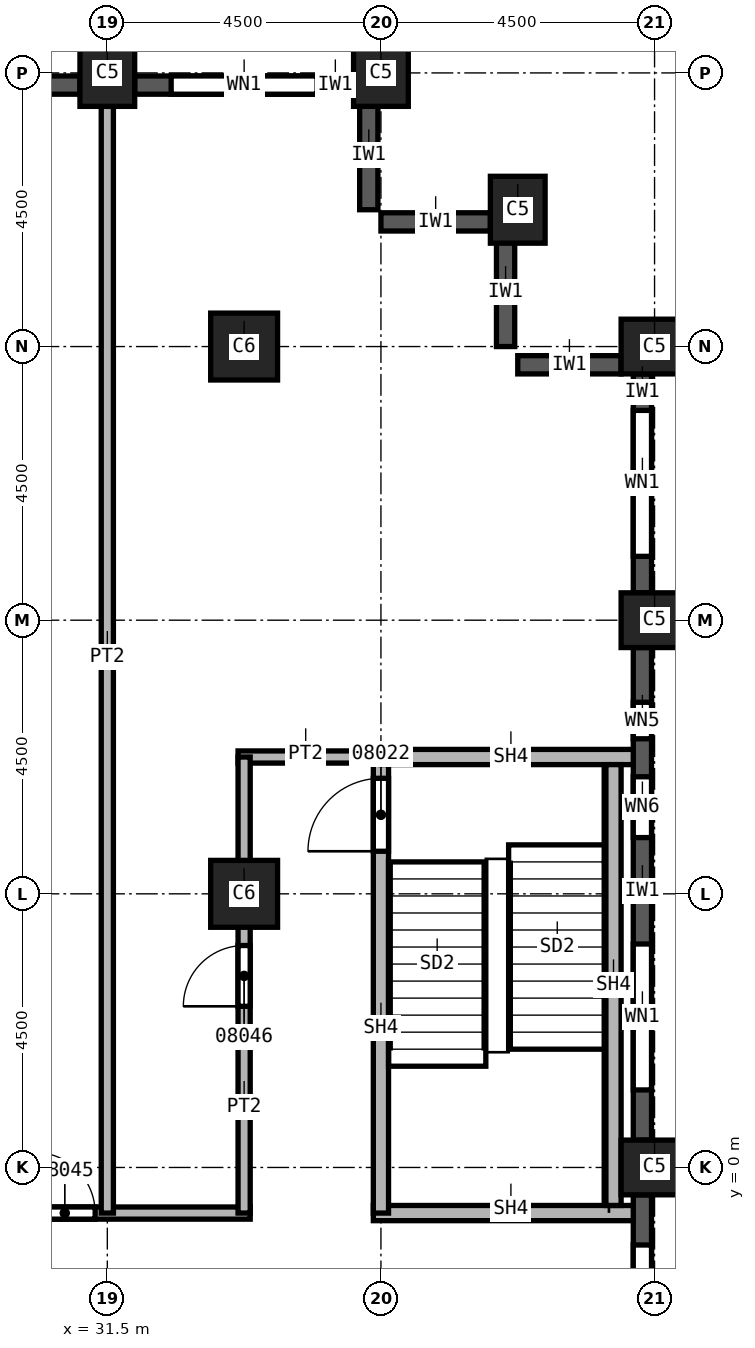
"""IFC4 building model, lengths in metres.
Left out: names, types, materials, properties, quantities, classifications, styles, units other than length and angle.
Written with IfcOpenShell. Run it as: python <this file> out.ifc"""

import sys

from ifc_helpers import new_model, si_unit, direction, frame, frame_2d, origin, origin_2d, place, context, subcontext, project, spatial, rectangle, extrude, element, fill, save


model = new_model("IFC4")
c1 = context("Model", 3, precision=1e-05, world=origin(), true_north=direction((0.0, 1.0)))
c2 = subcontext(c1, "Body", "Model", "MODEL_VIEW")
j1 = project(units=[si_unit("LENGTHUNIT", "METRE"), si_unit("PLANEANGLEUNIT", "RADIAN")], contexts=[c1])
p1 = place(None, origin())
s1 = spatial("IfcSite", under=j1, at=p1, CompositionType="ELEMENT")
p2 = place(p1, origin())
s2 = spatial("IfcBuilding", under=s1, at=p2, CompositionType="ELEMENT")
p3 = place(p2, frame((0.0, 0.0, 150.0)))
s3 = spatial("IfcBuildingStorey", under=s2, at=p3, CompositionType="ELEMENT", Elevation=150.0)
for number, where, z_axis, x_axis in (
    (1, (40.5, 0.0, 0.0), (0.0, 0.0, 1.0), (0.0, 1.0, 0.0)),
    (2, (40.5, 9.0, 0.0), (0.0, 0.0, 1.0), (0.0, 1.0, 0.0)),
    (3, (40.5, 13.5, 0.0), (0.0, 0.0, 1.0), (0.0, 1.0, 0.0)),
    (4, (38.25, 15.75, 0.0), (0.0, 0.0, 1.0), (1.0, 0.0, 0.0)),
    (5, (31.5, 18.0, 0.0), (0.0, 0.0, 1.0), (1.0, 0.0, 0.0)),
    (6, (36.0, 18.0, 0.0), (0.0, 0.0, 1.0), (1.0, 0.0, 0.0)),
):
    element("IfcColumn", number, at=place(p3, frame(where, z_axis=z_axis, x_axis=x_axis)), inside=s3, PredefinedType="COLUMN", context=c2, shape_type="SweptSolid", body=[
        extrude(rectangle(XDim=0.9, YDim=1.1, at=origin_2d()), origin(), (0.0, 0.0, 1.0), 3.7),
    ])
for number, where, z_axis, x_axis in (
    (7, (33.75, 4.5, 0.0), (0.0, 0.0, 1.0), (1.0, 0.0, 0.0)),
    (8, (33.75, 13.5, 0.0), (0.0, 0.0, 1.0), (1.0, 0.0, 0.0)),
):
    element("IfcColumn", number, at=place(p3, frame(where, z_axis=z_axis, x_axis=x_axis)), inside=s3, PredefinedType="COLUMN", context=c2, shape_type="SweptSolid", body=[
        extrude(rectangle(XDim=1.1, YDim=1.1, at=origin_2d()), origin(), (0.0, 0.0, 1.0), 3.7),
    ])
p4 = place(p3, frame((39.95, 13.2, 0.0), z_axis=(0.0, 0.0, 1.0), x_axis=(-1.0, 0.0, 0.0)))
e9 = element("IfcWall", 9, at=p4, inside=s3, PredefinedType="SOLIDWALL", context=c2, shape_type="SweptSolid", body=[
    extrude(rectangle(XDim=1.7, YDim=0.3, at=frame_2d((0.85, 0.0))), origin(), (0.0, 0.0, 1.0), 3.1),
])
for number, where, z_axis, x_axis in (
    (10, (38.05, 15.3, 0.0), (0.0, 0.0, 1.0), (0.0, -1.0, 0.0)),
    (11, (37.8, 15.55, 0.0), (0.0, 0.0, 1.0), (-1.0, 0.0, 0.0)),
    (12, (35.8, 17.55, 0.0), (0.0, 0.0, 1.0), (0.0, -1.0, 0.0)),
):
    element("IfcWall", number, at=place(p3, frame(where, z_axis=z_axis, x_axis=x_axis)), inside=s3, PredefinedType="SOLIDWALL", context=c2, shape_type="SweptSolid", body=[
        extrude(rectangle(XDim=1.8, YDim=0.3, at=frame_2d((0.9, 0.0))), origin(), (0.0, 0.0, 1.0), 3.1),
    ])
p5 = place(p3, frame((40.3, -8.55, 0.0), z_axis=(0.0, 0.0, 1.0), x_axis=(0.0, 1.0, 0.0)))
e13 = element("IfcWall", 13, at=p5, inside=s3, PredefinedType="SOLIDWALL", context=c2, shape_type="SweptSolid", body=[
    extrude(rectangle(XDim=8.1, YDim=0.3, at=frame_2d((4.05, 0.0))), origin(), (0.0, 0.0, 1.0), 3.1),
])
p6 = place(p5, frame((0.825, 0.0, 0.8)))
e14 = element("IfcOpeningElement", 14, at=p6, cuts=e13, PredefinedType="OPENING", context=c2, shape_type="SweptSolid", body=[
    extrude(rectangle(XDim=2.4, YDim=1.95, at=frame_2d((1.2, 0.975))), frame((0.0, 0.15, 0.0), z_axis=(0.0, -1.0, 0.0), x_axis=(1.0, 0.0, 0.0)), (0.0, 0.0, 1.0), 0.3),
])
p7 = place(p5, frame((4.875, 0.0, 0.8)))
e15 = element("IfcOpeningElement", 15, at=p7, cuts=e13, PredefinedType="OPENING", context=c2, shape_type="SweptSolid", body=[
    extrude(rectangle(XDim=2.4, YDim=1.95, at=frame_2d((1.2, 0.975))), frame((0.0, 0.15, 0.0), z_axis=(0.0, -1.0, 0.0), x_axis=(1.0, 0.0, 0.0)), (0.0, 0.0, 1.0), 0.3),
])
p8 = place(p3, frame((40.3, 0.45, 0.0), z_axis=(0.0, 0.0, 1.0), x_axis=(0.0, 1.0, 0.0)))
e16 = element("IfcWall", 16, at=p8, inside=s3, PredefinedType="SOLIDWALL", context=c2, shape_type="SweptSolid", body=[
    extrude(rectangle(XDim=8.1, YDim=0.3, at=frame_2d((4.05, 0.0))), origin(), (0.0, 0.0, 1.0), 3.1),
])
p9 = place(p8, frame((0.825, 0.0, 0.8)))
e17 = element("IfcOpeningElement", 17, at=p9, cuts=e16, PredefinedType="OPENING", context=c2, shape_type="SweptSolid", body=[
    extrude(rectangle(XDim=2.4, YDim=1.95, at=frame_2d((1.2, 0.975))), frame((0.0, 0.15, 0.0), z_axis=(0.0, -1.0, 0.0), x_axis=(1.0, 0.0, 0.0)), (0.0, 0.0, 1.0), 0.3),
])
p10 = place(p8, frame((4.975, 0.0, 0.8)))
e18 = element("IfcOpeningElement", 18, at=p10, cuts=e16, PredefinedType="OPENING", context=c2, shape_type="SweptSolid", body=[
    extrude(rectangle(XDim=1.0, YDim=1.95, at=frame_2d((0.5, 0.975))), frame((0.0, 0.15, 0.0), z_axis=(0.0, -1.0, 0.0), x_axis=(1.0, 0.0, 0.0)), (0.0, 0.0, 1.0), 0.3),
])
p11 = place(p8, frame((6.6, 0.0, 0.8)))
e19 = element("IfcOpeningElement", 19, at=p11, cuts=e16, PredefinedType="OPENING", context=c2, shape_type="SweptSolid", body=[
    extrude(rectangle(XDim=0.6, YDim=1.95, at=frame_2d((0.3, 0.975))), frame((0.0, 0.15, 0.0), z_axis=(0.0, -1.0, 0.0), x_axis=(1.0, 0.0, 0.0)), (0.0, 0.0, 1.0), 0.3),
])
p12 = place(p3, frame((40.3, 9.45, 0.0), z_axis=(0.0, 0.0, 1.0), x_axis=(0.0, 1.0, 0.0)))
e20 = element("IfcWall", 20, at=p12, inside=s3, PredefinedType="SOLIDWALL", context=c2, shape_type="SweptSolid", body=[
    extrude(rectangle(XDim=3.6, YDim=0.3, at=frame_2d((1.8, 0.0))), origin(), (0.0, 0.0, 1.0), 3.1),
])
p13 = place(p12, frame((0.6, 0.0, 0.8)))
e21 = element("IfcOpeningElement", 21, at=p13, cuts=e20, PredefinedType="OPENING", context=c2, shape_type="SweptSolid", body=[
    extrude(rectangle(XDim=2.4, YDim=1.95, at=frame_2d((1.2, 0.975))), frame((0.0, 0.15, 0.0), z_axis=(0.0, -1.0, 0.0), x_axis=(1.0, 0.0, 0.0)), (0.0, 0.0, 1.0), 0.3),
])
p14 = place(p3, frame((35.55, 17.8, 0.0), z_axis=(0.0, 0.0, 1.0), x_axis=(-1.0, 0.0, 0.0)))
e22 = element("IfcWall", 22, at=p14, inside=s3, PredefinedType="SOLIDWALL", context=c2, shape_type="SweptSolid", body=[
    extrude(rectangle(XDim=3.6, YDim=0.3, at=frame_2d((1.8, 0.0))), origin(), (0.0, 0.0, 1.0), 3.1),
])
p15 = place(p14, frame((0.6, 0.0, 0.8)))
e23 = element("IfcOpeningElement", 23, at=p15, cuts=e22, PredefinedType="OPENING", context=c2, shape_type="SweptSolid", body=[
    extrude(rectangle(XDim=2.4, YDim=1.95, at=frame_2d((1.2, 0.975))), frame((0.0, 0.15, 0.0), z_axis=(0.0, -1.0, 0.0), x_axis=(1.0, 0.0, 0.0)), (0.0, 0.0, 1.0), 0.3),
])
p16 = place(p3, frame((31.05, 17.8, 0.0), z_axis=(0.0, 0.0, 1.0), x_axis=(-1.0, 0.0, 0.0)))
e24 = element("IfcWall", 24, at=p16, inside=s3, PredefinedType="SOLIDWALL", context=c2, shape_type="SweptSolid", body=[
    extrude(rectangle(XDim=3.6, YDim=0.3, at=frame_2d((1.8, 0.0))), origin(), (0.0, 0.0, 1.0), 3.1),
])
p17 = place(p16, frame((0.6, 0.0, 0.8)))
e25 = element("IfcOpeningElement", 25, at=p17, cuts=e24, PredefinedType="OPENING", context=c2, shape_type="SweptSolid", body=[
    extrude(rectangle(XDim=2.4, YDim=1.95, at=frame_2d((1.2, 0.975))), frame((0.0, 0.15, 0.0), z_axis=(0.0, -1.0, 0.0), x_axis=(1.0, 0.0, 0.0)), (0.0, 0.0, 1.0), 0.3),
])
p18 = place(p3, frame((19.9, -0.75, 0.0), z_axis=(0.0, 0.0, 1.0), x_axis=(1.0, 0.0, 0.0)))
e26 = element("IfcWall", 26, at=p18, inside=s3, PredefinedType="PARTITIONING", context=c2, shape_type="SweptSolid", body=[
    extrude(rectangle(XDim=13.95, YDim=0.2, at=frame_2d((6.975, 0.0))), origin(), (0.0, 0.0, 1.0), 3.7),
])
p19 = place(p18, frame((10.4, 0.0, 0.0)))
e27 = element("IfcOpeningElement", 27, at=p19, cuts=e26, PredefinedType="OPENING", context=c2, shape_type="SweptSolid", body=[
    extrude(rectangle(XDim=1.0, YDim=2.1, at=frame_2d((0.5, 1.05))), frame((0.0, 0.1, 0.0), z_axis=(0.0, -1.0, 0.0), x_axis=(1.0, 0.0, 0.0)), (0.0, 0.0, 1.0), 0.2),
])
p20 = place(p3, frame((31.5, 17.45, 0.0), z_axis=(0.0, 0.0, 1.0), x_axis=(0.0, -1.0, 0.0)))
e28 = element("IfcWall", 28, at=p20, inside=s3, PredefinedType="PARTITIONING", context=c2, shape_type="SweptSolid", body=[
    extrude(rectangle(XDim=18.2, YDim=0.2, at=frame_2d((9.1, 0.0))), origin(), (0.0, 0.0, 1.0), 3.7),
])
p21 = place(p3, frame((33.65, 6.75, 0.0), z_axis=(0.0, 0.0, 1.0), x_axis=(1.0, 0.0, 0.0)))
e29 = element("IfcWall", 29, at=p21, inside=s3, PredefinedType="PARTITIONING", context=c2, shape_type="SweptSolid", body=[
    extrude(rectangle(XDim=2.35, YDim=0.2, at=frame_2d((1.175, 0.0))), origin(), (0.0, 0.0, 1.0), 3.7),
])
p22 = place(p3, frame((33.75, -0.75, 0.0), z_axis=(0.0, 0.0, 1.0), x_axis=(0.0, 1.0, 0.0)))
e30 = element("IfcWall", 30, at=p22, inside=s3, PredefinedType="PARTITIONING", context=c2, shape_type="SweptSolid", body=[
    extrude(rectangle(XDim=7.5, YDim=0.2, at=frame_2d((3.75, 0.0))), origin(), (0.0, 0.0, 1.0), 3.7),
])
p23 = place(p22, frame((3.4, 0.0, 0.0)))
e31 = element("IfcOpeningElement", 31, at=p23, cuts=e30, PredefinedType="OPENING", context=c2, shape_type="SweptSolid", body=[
    extrude(rectangle(XDim=1.0, YDim=2.1, at=frame_2d((0.5, 1.05))), frame((0.0, 0.1, 0.0), z_axis=(0.0, -1.0, 0.0), x_axis=(1.0, 0.0, 0.0)), (0.0, 0.0, 1.0), 0.2),
])
p24 = place(p3, frame((35.875, -0.75, 0.0), z_axis=(0.0, 0.0, 1.0), x_axis=(1.0, 0.0, 0.0)))
e32 = element("IfcWall", 32, at=p24, inside=s3, PredefinedType="SOLIDWALL", context=c2, shape_type="SweptSolid", body=[
    extrude(rectangle(XDim=4.275, YDim=0.25, at=frame_2d((2.137, 0.0))), origin(), (0.0, 0.0, 1.0), 3.7),
])
p25 = place(p3, frame((36.0, -0.75, 0.0), z_axis=(0.0, 0.0, 1.0), x_axis=(0.0, 1.0, 0.0)))
e33 = element("IfcWall", 33, at=p25, inside=s3, PredefinedType="SOLIDWALL", context=c2, shape_type="SweptSolid", body=[
    extrude(rectangle(XDim=7.625, YDim=0.25, at=frame_2d((3.812, 0.0))), origin(), (0.0, 0.0, 1.0), 3.7),
])
p26 = place(p25, frame((5.95, 0.0, 0.0)))
e34 = element("IfcOpeningElement", 34, at=p26, cuts=e33, PredefinedType="OPENING", context=c2, shape_type="SweptSolid", body=[
    extrude(rectangle(XDim=1.2, YDim=2.1, at=frame_2d((0.6, 1.05))), frame((0.0, 0.125, 0.0), z_axis=(0.0, -1.0, 0.0), x_axis=(1.0, 0.0, 0.0)), (0.0, 0.0, 1.0), 0.25),
])
p27 = place(p3, frame((36.0, 6.75, 0.0), z_axis=(0.0, 0.0, 1.0), x_axis=(1.0, 0.0, 0.0)))
e35 = element("IfcWall", 35, at=p27, inside=s3, PredefinedType="SOLIDWALL", context=c2, shape_type="SweptSolid", body=[
    extrude(rectangle(XDim=4.15, YDim=0.25, at=frame_2d((2.075, 0.0))), origin(), (0.0, 0.0, 1.0), 3.7),
])
p28 = place(p3, frame((39.825, -0.625, 0.0), z_axis=(0.0, 0.0, 1.0), x_axis=(0.0, 1.0, 0.0)))
e36 = element("IfcWall", 36, at=p28, inside=s3, PredefinedType="SOLIDWALL", context=c2, shape_type="SweptSolid", body=[
    extrude(rectangle(XDim=7.25, YDim=0.25, at=frame_2d((3.625, 0.0))), origin(), (0.0, 0.0, 1.0), 3.7),
])
p29 = place(p7, origin())
e37 = element("IfcWindow", 37, at=p29, inside=s3, PartitioningType="SINGLE_PANEL", PredefinedType="WINDOW", context=c2, shape_type="SweptSolid", body=[
    extrude(rectangle(XDim=2.4, YDim=1.95, at=frame_2d((1.2, 0.975))), frame((0.0, 0.03, 0.0), z_axis=(0.0, -1.0, 0.0), x_axis=(1.0, 0.0, 0.0)), (0.0, 0.0, 1.0), 0.06),
])
fill(e15, e37)
p30 = place(p9, origin())
e38 = element("IfcWindow", 38, at=p30, inside=s3, PartitioningType="SINGLE_PANEL", PredefinedType="WINDOW", context=c2, shape_type="SweptSolid", body=[
    extrude(rectangle(XDim=2.4, YDim=1.95, at=frame_2d((1.2, 0.975))), frame((0.0, 0.03, 0.0), z_axis=(0.0, -1.0, 0.0), x_axis=(1.0, 0.0, 0.0)), (0.0, 0.0, 1.0), 0.06),
])
fill(e17, e38)
p31 = place(p13, origin())
e39 = element("IfcWindow", 39, at=p31, inside=s3, PartitioningType="SINGLE_PANEL", PredefinedType="WINDOW", context=c2, shape_type="SweptSolid", body=[
    extrude(rectangle(XDim=2.4, YDim=1.95, at=frame_2d((1.2, 0.975))), frame((0.0, 0.03, 0.0), z_axis=(0.0, -1.0, 0.0), x_axis=(1.0, 0.0, 0.0)), (0.0, 0.0, 1.0), 0.06),
])
fill(e21, e39)
p32 = place(p15, origin())
e40 = element("IfcWindow", 40, at=p32, inside=s3, PartitioningType="SINGLE_PANEL", PredefinedType="WINDOW", context=c2, shape_type="SweptSolid", body=[
    extrude(rectangle(XDim=2.4, YDim=1.95, at=frame_2d((1.2, 0.975))), frame((0.0, 0.03, 0.0), z_axis=(0.0, -1.0, 0.0), x_axis=(1.0, 0.0, 0.0)), (0.0, 0.0, 1.0), 0.06),
])
fill(e23, e40)
p33 = place(p26, origin())
e41 = element("IfcDoor", 41, at=p33, inside=s3, OperationType="SINGLE_SWING_LEFT", PredefinedType="DOOR", context=c2, shape_type="SweptSolid", body=[
    extrude(rectangle(XDim=1.2, YDim=2.1, at=frame_2d((0.6, 1.05))), frame((0.0, 0.025, 0.0), z_axis=(0.0, -1.0, 0.0), x_axis=(1.0, 0.0, 0.0)), (0.0, 0.0, 1.0), 0.05),
])
fill(e34, e41)
p34 = place(p19, origin())
e42 = element("IfcDoor", 42, at=p34, inside=s3, OperationType="SINGLE_SWING_RIGHT", PredefinedType="DOOR", context=c2, shape_type="SweptSolid", body=[
    extrude(rectangle(XDim=1.0, YDim=2.1, at=frame_2d((0.5, 1.05))), frame((0.0, 0.025, 0.0), z_axis=(0.0, -1.0, 0.0), x_axis=(1.0, 0.0, 0.0)), (0.0, 0.0, 1.0), 0.05),
])
fill(e27, e42)
p35 = place(p23, origin())
e43 = element("IfcDoor", 43, at=p35, inside=s3, OperationType="SINGLE_SWING_LEFT", PredefinedType="DOOR", context=c2, shape_type="SweptSolid", body=[
    extrude(rectangle(XDim=1.0, YDim=2.1, at=frame_2d((0.5, 1.05))), frame((0.0, 0.025, 0.0), z_axis=(0.0, -1.0, 0.0), x_axis=(1.0, 0.0, 0.0)), (0.0, 0.0, 1.0), 0.05),
])
fill(e31, e43)
p36 = place(p10, origin())
e44 = element("IfcWindow", 44, at=p36, inside=s3, PartitioningType="SINGLE_PANEL", PredefinedType="WINDOW", context=c2, shape_type="SweptSolid", body=[
    extrude(rectangle(XDim=1.0, YDim=1.95, at=frame_2d((0.5, 0.975))), frame((0.0, 0.03, 0.0), z_axis=(0.0, -1.0, 0.0), x_axis=(1.0, 0.0, 0.0)), (0.0, 0.0, 1.0), 0.06),
])
fill(e18, e44)
p37 = place(p11, origin())
e45 = element("IfcWindow", 45, at=p37, inside=s3, PartitioningType="SINGLE_PANEL", PredefinedType="WINDOW", context=c2, shape_type="SweptSolid", body=[
    extrude(rectangle(XDim=0.6, YDim=1.95, at=frame_2d((0.3, 0.975))), frame((0.0, 0.03, 0.0), z_axis=(0.0, -1.0, 0.0), x_axis=(1.0, 0.0, 0.0)), (0.0, 0.0, 1.0), 0.06),
])
fill(e19, e45)
save(model, sys.argv[1])
